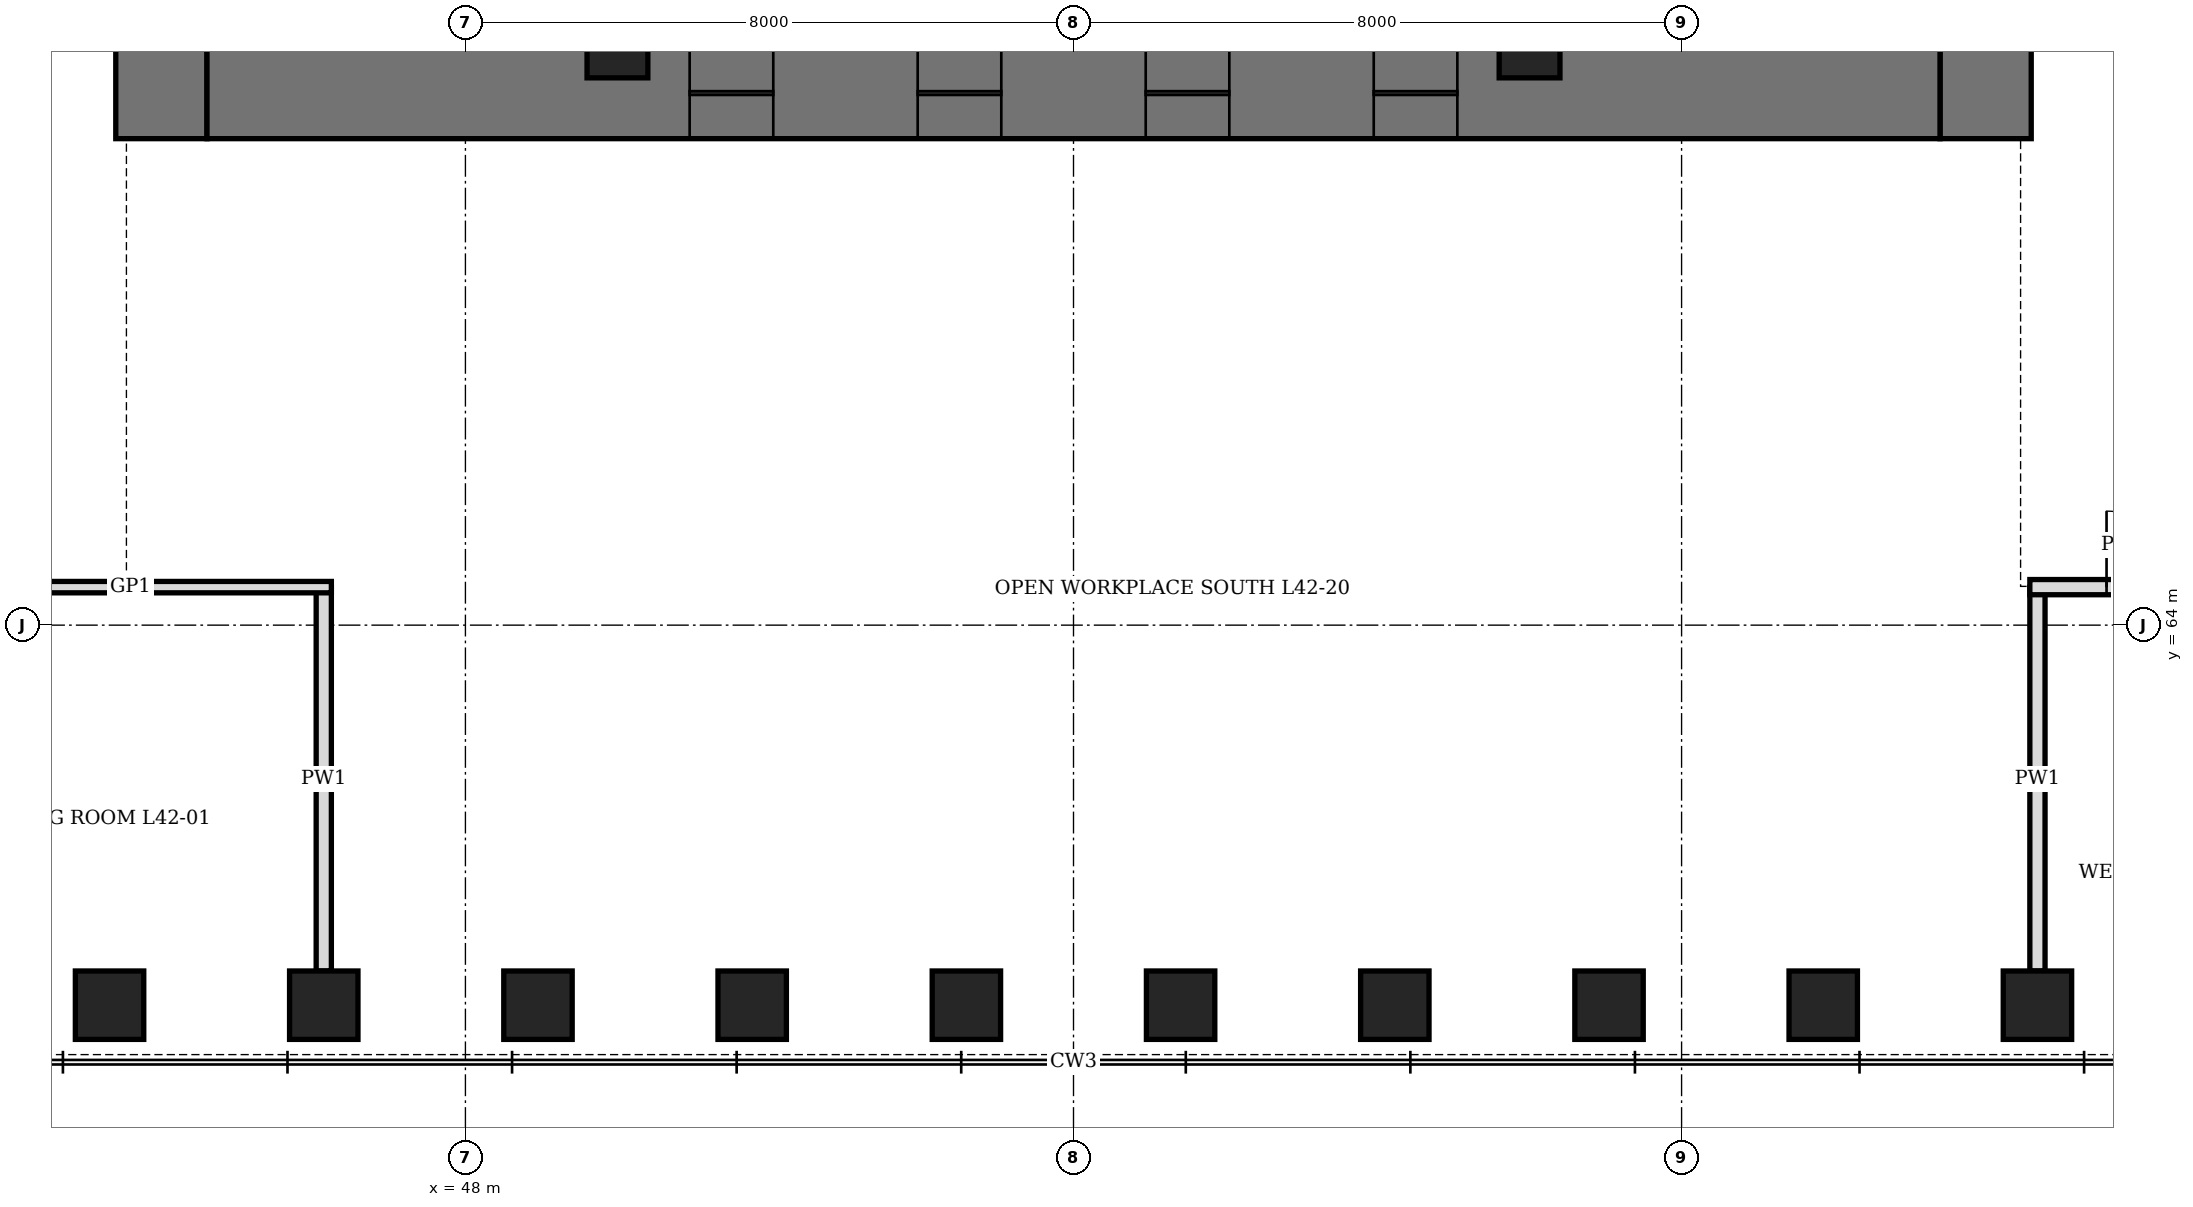
"""IFC4 building model, lengths in metres.
Left out: names, types, materials, properties, quantities, classifications, styles, units other than length and angle.
Written with IfcOpenShell. Run it as: python <this file> out.ifc"""

import sys

from ifc_helpers import new_model, si_unit, direction, frame, frame_2d, origin, origin_2d, place, context, subcontext, project, spatial, rectangle, hollow_rectangle, extrude, element, fill, save


model = new_model("IFC4")
c1 = context("Model", 3, precision=1e-05, world=origin(), true_north=direction((0.0, 1.0)))
c2 = subcontext(c1, "Body", "Model", "MODEL_VIEW")
j1 = project(units=[si_unit("LENGTHUNIT", "METRE"), si_unit("PLANEANGLEUNIT", "RADIAN")], contexts=[c1])
p1 = place(None, origin())
s1 = spatial("IfcSite", under=j1, at=p1, CompositionType="ELEMENT")
p2 = place(p1, origin())
s2 = spatial("IfcBuilding", under=s1, at=p2, CompositionType="ELEMENT")
p3 = place(p2, frame((0.0, 0.0, 189.7)))
s3 = spatial("IfcBuildingStorey", under=s2, at=p3, CompositionType="ELEMENT", Elevation=189.7)
for number, where, z_axis, x_axis in (
    (1, (43.318, 59.0, 0.0), (0.0, 0.0, 1.0), (1.0, 0.0, 0.0)),
    (2, (46.136, 59.0, 0.0), (0.0, 0.0, 1.0), (1.0, 0.0, 0.0)),
    (3, (48.955, 59.0, 0.0), (0.0, 0.0, 1.0), (1.0, 0.0, 0.0)),
    (4, (51.773, 59.0, 0.0), (0.0, 0.0, 1.0), (1.0, 0.0, 0.0)),
    (5, (54.591, 59.0, 0.0), (0.0, 0.0, 1.0), (1.0, 0.0, 0.0)),
    (6, (57.409, 59.0, 0.0), (0.0, 0.0, 1.0), (1.0, 0.0, 0.0)),
    (7, (60.227, 59.0, 0.0), (0.0, 0.0, 1.0), (1.0, 0.0, 0.0)),
    (8, (63.045, 59.0, 0.0), (0.0, 0.0, 1.0), (1.0, 0.0, 0.0)),
    (9, (65.864, 59.0, 0.0), (0.0, 0.0, 1.0), (1.0, 0.0, 0.0)),
    (10, (68.682, 59.0, 0.0), (0.0, 0.0, 1.0), (1.0, 0.0, 0.0)),
):
    element("IfcColumn", number, at=place(p3, frame(where, z_axis=z_axis, x_axis=x_axis)), inside=s3, PredefinedType="COLUMN", context=c2, shape_type="SweptSolid", body=[
        extrude(hollow_rectangle(XDim=0.9, YDim=0.9, WallThickness=0.12, at=origin_2d()), origin(), (0.0, 0.0, 1.0), 4.2),
    ])
p4 = place(p3, frame((44.0, 70.4, 0.0), z_axis=(0.0, 0.0, 1.0), x_axis=(0.0, 1.0, 0.0)))
e11 = element("IfcWall", 11, at=p4, inside=s3, PredefinedType="SHEAR", context=c2, shape_type="SweptSolid", body=[
    extrude(rectangle(XDim=19.2, YDim=1.2, at=frame_2d((9.6, 0.0))), origin(), (0.0, 0.0, 1.0), 4.2),
])
p5 = place(p4, frame((8.6, 0.0, 0.0)))
e12 = element("IfcOpeningElement", 12, at=p5, cuts=e11, PredefinedType="OPENING", context=c2, shape_type="SweptSolid", body=[
    extrude(rectangle(XDim=2.0, YDim=2.4, at=frame_2d((1.0, 1.2))), frame((0.0, 0.61, 0.0), z_axis=(0.0, -1.0, 0.0), x_axis=(1.0, 0.0, 0.0)), (0.0, 0.0, 1.0), 1.22),
])
p6 = place(p3, frame((68.0, 70.4, 0.0), z_axis=(0.0, 0.0, 1.0), x_axis=(0.0, 1.0, 0.0)))
e13 = element("IfcWall", 13, at=p6, inside=s3, PredefinedType="SHEAR", context=c2, shape_type="SweptSolid", body=[
    extrude(rectangle(XDim=19.2, YDim=1.2, at=frame_2d((9.6, 0.0))), origin(), (0.0, 0.0, 1.0), 4.2),
])
p7 = place(p6, frame((8.6, 0.0, 0.0)))
e14 = element("IfcOpeningElement", 14, at=p7, cuts=e13, PredefinedType="OPENING", context=c2, shape_type="SweptSolid", body=[
    extrude(rectangle(XDim=2.0, YDim=2.4, at=frame_2d((1.0, 1.2))), frame((0.0, 0.61, 0.0), z_axis=(0.0, -1.0, 0.0), x_axis=(1.0, 0.0, 0.0)), (0.0, 0.0, 1.0), 1.22),
])
p8 = place(p3, frame((44.6, 71.0, 0.0), z_axis=(0.0, 0.0, 1.0), x_axis=(1.0, 0.0, 0.0)))
e15 = element("IfcWall", 15, at=p8, inside=s3, PredefinedType="SHEAR", context=c2, shape_type="SweptSolid", body=[
    extrude(rectangle(XDim=22.8, YDim=1.2, at=frame_2d((11.4, 0.0))), origin(), (0.0, 0.0, 1.0), 4.2),
])
p9 = place(p8, frame((6.35, 0.0, 0.0)))
e16 = element("IfcOpeningElement", 16, at=p9, cuts=e15, PredefinedType="OPENING", context=c2, shape_type="SweptSolid", body=[
    extrude(rectangle(XDim=1.1, YDim=2.2, at=frame_2d((0.55, 1.1))), frame((0.0, 0.61, 0.0), z_axis=(0.0, -1.0, 0.0), x_axis=(1.0, 0.0, 0.0)), (0.0, 0.0, 1.0), 1.22),
])
p10 = place(p8, frame((9.35, 0.0, 0.0)))
e17 = element("IfcOpeningElement", 17, at=p10, cuts=e15, PredefinedType="OPENING", context=c2, shape_type="SweptSolid", body=[
    extrude(rectangle(XDim=1.1, YDim=2.2, at=frame_2d((0.55, 1.1))), frame((0.0, 0.61, 0.0), z_axis=(0.0, -1.0, 0.0), x_axis=(1.0, 0.0, 0.0)), (0.0, 0.0, 1.0), 1.22),
])
p11 = place(p8, frame((12.35, 0.0, 0.0)))
e18 = element("IfcOpeningElement", 18, at=p11, cuts=e15, PredefinedType="OPENING", context=c2, shape_type="SweptSolid", body=[
    extrude(rectangle(XDim=1.1, YDim=2.2, at=frame_2d((0.55, 1.1))), frame((0.0, 0.61, 0.0), z_axis=(0.0, -1.0, 0.0), x_axis=(1.0, 0.0, 0.0)), (0.0, 0.0, 1.0), 1.22),
])
p12 = place(p8, frame((15.35, 0.0, 0.0)))
e19 = element("IfcOpeningElement", 19, at=p12, cuts=e15, PredefinedType="OPENING", context=c2, shape_type="SweptSolid", body=[
    extrude(rectangle(XDim=1.1, YDim=2.2, at=frame_2d((0.55, 1.1))), frame((0.0, 0.61, 0.0), z_axis=(0.0, -1.0, 0.0), x_axis=(1.0, 0.0, 0.0)), (0.0, 0.0, 1.0), 1.22),
])
for number, where, z_axis, x_axis in (
    (20, (50.0, 71.6, 0.0), (0.0, 0.0, 1.0), (1.0, 0.0, 0.0)),
    (21, (62.0, 71.6, 0.0), (0.0, 0.0, 1.0), (1.0, 0.0, 0.0)),
):
    element("IfcColumn", number, at=place(p3, frame(where, z_axis=z_axis, x_axis=x_axis)), inside=s3, PredefinedType="COLUMN", context=c2, shape_type="SweptSolid", body=[
        extrude(hollow_rectangle(XDim=0.8, YDim=0.8, WallThickness=0.1, at=origin_2d()), origin(), (0.0, 0.0, 1.0), 4.2),
    ])
for number, where, z_axis, x_axis in (
    (22, (46.136, 59.45, 0.0), (0.0, 0.0, 1.0), (0.0, 1.0, 0.0)),
    (23, (68.682, 59.45, 0.0), (0.0, 0.0, 1.0), (0.0, 1.0, 0.0)),
):
    element("IfcWall", number, at=place(p3, frame(where, z_axis=z_axis, x_axis=x_axis)), inside=s3, PredefinedType="PARTITIONING", context=c2, shape_type="SweptSolid", body=[
        extrude(rectangle(XDim=5.05, YDim=0.2, at=frame_2d((2.525, 0.0))), origin(), (0.0, 0.0, 1.0), 3.428),
    ])
p13 = place(p3, frame((40.95, 64.5, 0.0), z_axis=(0.0, 0.0, 1.0), x_axis=(1.0, 0.0, 0.0)))
e24 = element("IfcWall", 24, at=p13, inside=s3, PredefinedType="PARTITIONING", context=c2, shape_type="SweptSolid", body=[
    extrude(rectangle(XDim=5.286, YDim=0.15, at=frame_2d((2.643, 0.0))), origin(), (0.0, 0.0, 1.0), 4.04),
])
p14 = place(p13, frame((0.459, 0.0, 0.0)))
e25 = element("IfcOpeningElement", 25, at=p14, cuts=e24, PredefinedType="OPENING", context=c2, shape_type="SweptSolid", body=[
    extrude(rectangle(XDim=1.0, YDim=2.4, at=frame_2d((0.5, 1.2))), frame((0.0, 0.085, 0.0), z_axis=(0.0, -1.0, 0.0), x_axis=(1.0, 0.0, 0.0)), (0.0, 0.0, 1.0), 0.17),
])
p15 = place(p3, frame((68.582, 64.5, 0.0), z_axis=(0.0, 0.0, 1.0), x_axis=(1.0, 0.0, 0.0)))
e26 = element("IfcWall", 26, at=p15, inside=s3, PredefinedType="PARTITIONING", context=c2, shape_type="SweptSolid", body=[
    extrude(rectangle(XDim=2.468, YDim=0.2, at=frame_2d((1.234, 0.0))), origin(), (0.0, 0.0, 1.0), 4.04),
])
p16 = place(p15, frame((1.009, 0.0, 0.0)))
e27 = element("IfcOpeningElement", 27, at=p16, cuts=e26, PredefinedType="OPENING", context=c2, shape_type="SweptSolid", body=[
    extrude(rectangle(XDim=1.0, YDim=2.1, at=frame_2d((0.5, 1.05))), frame((0.0, 0.11, 0.0), z_axis=(0.0, -1.0, 0.0), x_axis=(1.0, 0.0, 0.0)), (0.0, 0.0, 1.0), 0.22),
])
p17 = place(p9, origin())
e28 = element("IfcDoor", 28, at=p17, inside=s3, OperationType="SLIDING_TO_LEFT", PredefinedType="DOOR", context=c2, shape_type="SweptSolid", body=[
    extrude(rectangle(XDim=1.1, YDim=2.2, at=frame_2d((0.55, 1.1))), frame((0.0, 0.35, 0.0), z_axis=(0.0, -1.0, 0.0), x_axis=(1.0, 0.0, 0.0)), (0.0, 0.0, 1.0), 0.7),
])
fill(e16, e28)
p18 = place(p10, origin())
e29 = element("IfcDoor", 29, at=p18, inside=s3, OperationType="SLIDING_TO_LEFT", PredefinedType="DOOR", context=c2, shape_type="SweptSolid", body=[
    extrude(rectangle(XDim=1.1, YDim=2.2, at=frame_2d((0.55, 1.1))), frame((0.0, 0.35, 0.0), z_axis=(0.0, -1.0, 0.0), x_axis=(1.0, 0.0, 0.0)), (0.0, 0.0, 1.0), 0.7),
])
fill(e17, e29)
p19 = place(p11, origin())
e30 = element("IfcDoor", 30, at=p19, inside=s3, OperationType="SLIDING_TO_LEFT", PredefinedType="DOOR", context=c2, shape_type="SweptSolid", body=[
    extrude(rectangle(XDim=1.1, YDim=2.2, at=frame_2d((0.55, 1.1))), frame((0.0, 0.35, 0.0), z_axis=(0.0, -1.0, 0.0), x_axis=(1.0, 0.0, 0.0)), (0.0, 0.0, 1.0), 0.7),
])
fill(e18, e30)
p20 = place(p12, origin())
e31 = element("IfcDoor", 31, at=p20, inside=s3, OperationType="SLIDING_TO_LEFT", PredefinedType="DOOR", context=c2, shape_type="SweptSolid", body=[
    extrude(rectangle(XDim=1.1, YDim=2.2, at=frame_2d((0.55, 1.1))), frame((0.0, 0.35, 0.0), z_axis=(0.0, -1.0, 0.0), x_axis=(1.0, 0.0, 0.0)), (0.0, 0.0, 1.0), 0.7),
])
fill(e19, e31)
p21 = place(p16, origin())
e32 = element("IfcDoor", 32, at=p21, inside=s3, OperationType="SINGLE_SWING_LEFT", PredefinedType="DOOR", context=c2, shape_type="SweptSolid", body=[
    extrude(rectangle(XDim=1.0, YDim=2.1, at=frame_2d((0.5, 1.05))), frame((0.0, 0.1, 0.0), z_axis=(0.0, -1.0, 0.0), x_axis=(1.0, 0.0, 0.0)), (0.0, 0.0, 1.0), 0.199),
])
fill(e27, e32)
save(model, sys.argv[1])
